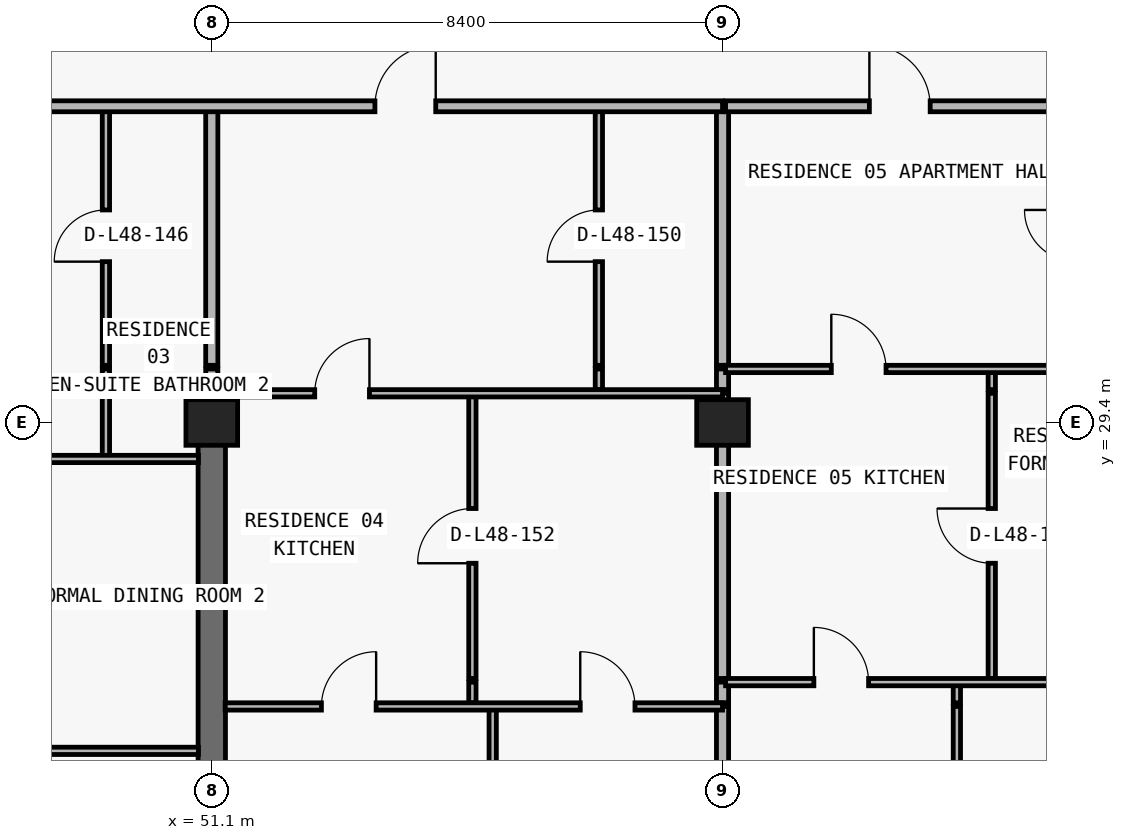
"""IFC4 building model, lengths in metres.
Left out: names, types, materials, properties, quantities, classifications, styles, units other than length and angle.
Written with IfcOpenShell. Run it as: python <this file> out.ifc"""

import sys

from ifc_helpers import new_model, si_unit, direction, frame, frame_2d, origin, origin_2d, place, context, subcontext, project, spatial, rectangle, extrude, element, fill, save


model = new_model("IFC4")
c1 = context("Model", 3, precision=1e-05, world=origin(), true_north=direction((0.0, 1.0)))
c2 = subcontext(c1, "Body", "Model", "MODEL_VIEW")
j1 = project(units=[si_unit("LENGTHUNIT", "METRE"), si_unit("PLANEANGLEUNIT", "RADIAN")], contexts=[c1])
p1 = place(None, origin())
s1 = spatial("IfcSite", under=j1, at=p1, CompositionType="ELEMENT")
p2 = place(p1, origin())
s2 = spatial("IfcBuilding", under=s1, at=p2, CompositionType="ELEMENT")
p3 = place(p2, frame((0.0, 0.0, 173.7)))
s3 = spatial("IfcBuildingStorey", under=s2, at=p3, CompositionType="ELEMENT", Elevation=173.7)
for number, where, z_axis, x_axis in (
    (1, (51.1, 29.4, 0.0), (0.0, 0.0, 1.0), (1.0, 0.0, 0.0)),
    (2, (59.5, 29.4, 0.0), (0.0, 0.0, 1.0), (1.0, 0.0, 0.0)),
):
    element("IfcColumn", number, at=place(p3, frame(where, z_axis=z_axis, x_axis=x_axis)), inside=s3, PredefinedType="COLUMN", context=c2, shape_type="SweptSolid", body=[
        extrude(rectangle(XDim=0.85, YDim=0.75, at=origin_2d()), origin(), (0.0, 0.0, 1.0), 3.05),
    ])
p4 = place(p3, frame((51.1, 20.8, 0.0), z_axis=(0.0, 0.0, 1.0), x_axis=(0.0, 1.0, 0.0)))
e3 = element("IfcWall", 3, at=p4, inside=s3, PredefinedType="SHEAR", context=c2, shape_type="SweptSolid", body=[
    extrude(rectangle(XDim=8.6, YDim=0.45, at=frame_2d((4.3, 0.0))), origin(), (0.0, 0.0, 1.0), 3.05),
])
p5 = place(p3, frame((49.359, 28.8, 0.0), z_axis=(0.0, 0.0, 1.0), x_axis=(0.0, 1.0, 0.0)))
e4 = element("IfcWall", 4, at=p5, inside=s3, PredefinedType="PARTITIONING", context=c2, shape_type="SweptSolid", body=[
    extrude(rectangle(XDim=1.08, YDim=0.12, at=frame_2d((0.54, 0.0))), origin(), (0.0, 0.0, 1.0), 3.05),
])
p6 = place(p3, frame((49.359, 29.94, 0.0), z_axis=(0.0, 0.0, 1.0), x_axis=(0.0, 1.0, 0.0)))
e5 = element("IfcWall", 5, at=p6, inside=s3, PredefinedType="PARTITIONING", context=c2, shape_type="SweptSolid", body=[
    extrude(rectangle(XDim=0.34, YDim=0.12, at=frame_2d((0.17, 0.0))), origin(), (0.0, 0.0, 1.0), 3.05),
])
p7 = place(p3, frame((49.359, 30.34, 0.0), z_axis=(0.0, 0.0, 1.0), x_axis=(0.0, 1.0, 0.0)))
e6 = element("IfcWall", 6, at=p7, inside=s3, PredefinedType="PARTITIONING", context=c2, shape_type="SweptSolid", body=[
    extrude(rectangle(XDim=4.26, YDim=0.12, at=frame_2d((2.13, 0.0))), origin(), (0.0, 0.0, 1.0), 3.05),
])
p8 = place(p7, frame((1.705, 0.0, 0.0)))
e7 = element("IfcOpeningElement", 7, at=p8, cuts=e6, PredefinedType="OPENING", context=c2, shape_type="SweptSolid", body=[
    extrude(rectangle(XDim=0.85, YDim=2.1, at=frame_2d((0.425, 1.05))), frame((0.0, 0.07, 0.0), z_axis=(0.0, -1.0, 0.0), x_axis=(1.0, 0.0, 0.0)), (0.0, 0.0, 1.0), 0.14),
])
p9 = place(p3, frame((51.1, 29.405, 0.0), z_axis=(0.0, 0.0, 1.0), x_axis=(0.0, 1.0, 0.0)))
e8 = element("IfcWall", 8, at=p9, inside=s3, PredefinedType="PARTITIONING", context=c2, shape_type="SweptSolid", body=[
    extrude(rectangle(XDim=0.475, YDim=0.2, at=frame_2d((0.237, 0.0))), origin(), (0.0, 0.0, 1.0), 2.335),
])
p10 = place(p3, frame((51.1, 29.94, 0.0), z_axis=(0.0, 0.0, 1.0), x_axis=(0.0, 1.0, 0.0)))
e9 = element("IfcWall", 9, at=p10, inside=s3, PredefinedType="PARTITIONING", context=c2, shape_type="SweptSolid", body=[
    extrude(rectangle(XDim=0.34, YDim=0.2, at=frame_2d((0.17, 0.0))), origin(), (0.0, 0.0, 1.0), 2.335),
])
p11 = place(p3, frame((51.1, 30.34, 0.0), z_axis=(0.0, 0.0, 1.0), x_axis=(0.0, 1.0, 0.0)))
e10 = element("IfcWall", 10, at=p11, inside=s3, PredefinedType="PARTITIONING", context=c2, shape_type="SweptSolid", body=[
    extrude(rectangle(XDim=4.26, YDim=0.2, at=frame_2d((2.13, 0.0))), origin(), (0.0, 0.0, 1.0), 2.335),
])
p12 = place(p3, frame((55.386, 24.79, 0.0), z_axis=(0.0, 0.0, 1.0), x_axis=(0.0, 1.0, 0.0)))
e11 = element("IfcWall", 11, at=p12, inside=s3, PredefinedType="PARTITIONING", context=c2, shape_type="SweptSolid", body=[
    extrude(rectangle(XDim=0.34, YDim=0.12, at=frame_2d((0.17, 0.0))), origin(), (0.0, 0.0, 1.0), 3.05),
])
p13 = place(p3, frame((55.386, 25.19, 0.0), z_axis=(0.0, 0.0, 1.0), x_axis=(0.0, 1.0, 0.0)))
e12 = element("IfcWall", 12, at=p13, inside=s3, PredefinedType="PARTITIONING", context=c2, shape_type="SweptSolid", body=[
    extrude(rectangle(XDim=4.69, YDim=0.12, at=frame_2d((2.345, 0.0))), origin(), (0.0, 0.0, 1.0), 2.725),
])
p14 = place(p13, frame((1.895, 0.0, 0.0)))
e13 = element("IfcOpeningElement", 13, at=p14, cuts=e12, PredefinedType="OPENING", context=c2, shape_type="SweptSolid", body=[
    extrude(rectangle(XDim=0.9, YDim=2.15, at=frame_2d((0.45, 1.075))), frame((0.0, 0.07, 0.0), z_axis=(0.0, -1.0, 0.0), x_axis=(1.0, 0.0, 0.0)), (0.0, 0.0, 1.0), 0.14),
])
p15 = place(p3, frame((55.72, 11.24, 0.0), z_axis=(0.0, 0.0, 1.0), x_axis=(0.0, 1.0, 0.0)))
e14 = element("IfcWall", 14, at=p15, inside=s3, PredefinedType="PARTITIONING", context=c2, shape_type="SweptSolid", body=[
    extrude(rectangle(XDim=13.49, YDim=0.12, at=frame_2d((6.745, 0.0))), origin(), (0.0, 0.0, 1.0), 3.05),
])
p16 = place(p3, frame((57.466, 29.94, 0.0), z_axis=(0.0, 0.0, 1.0), x_axis=(0.0, 1.0, 0.0)))
e15 = element("IfcWall", 15, at=p16, inside=s3, PredefinedType="PARTITIONING", context=c2, shape_type="SweptSolid", body=[
    extrude(rectangle(XDim=0.34, YDim=0.12, at=frame_2d((0.17, 0.0))), origin(), (0.0, 0.0, 1.0), 3.05),
])
p17 = place(p3, frame((57.466, 30.34, 0.0), z_axis=(0.0, 0.0, 1.0), x_axis=(0.0, 1.0, 0.0)))
e16 = element("IfcWall", 16, at=p17, inside=s3, PredefinedType="PARTITIONING", context=c2, shape_type="SweptSolid", body=[
    extrude(rectangle(XDim=4.26, YDim=0.12, at=frame_2d((2.13, 0.0))), origin(), (0.0, 0.0, 1.0), 3.05),
])
p18 = place(p17, frame((1.705, 0.0, 0.0)))
e17 = element("IfcOpeningElement", 17, at=p18, cuts=e16, PredefinedType="OPENING", context=c2, shape_type="SweptSolid", body=[
    extrude(rectangle(XDim=0.85, YDim=2.1, at=frame_2d((0.425, 1.05))), frame((0.0, 0.07, 0.0), z_axis=(0.0, -1.0, 0.0), x_axis=(1.0, 0.0, 0.0)), (0.0, 0.0, 1.0), 0.14),
])
p19 = place(p3, frame((59.5, 11.24, 0.0), z_axis=(0.0, 0.0, 1.0), x_axis=(0.0, 1.0, 0.0)))
e18 = element("IfcWall", 18, at=p19, inside=s3, PredefinedType="PARTITIONING", context=c2, shape_type="SweptSolid", body=[
    extrude(rectangle(XDim=13.49, YDim=0.2, at=frame_2d((6.745, 0.0))), origin(), (0.0, 0.0, 1.0), 2.263),
])
p20 = place(p3, frame((59.5, 24.79, 0.0), z_axis=(0.0, 0.0, 1.0), x_axis=(0.0, 1.0, 0.0)))
e19 = element("IfcWall", 19, at=p20, inside=s3, PredefinedType="PARTITIONING", context=c2, shape_type="SweptSolid", body=[
    extrude(rectangle(XDim=0.34, YDim=0.2, at=frame_2d((0.17, 0.0))), origin(), (0.0, 0.0, 1.0), 2.263),
])
p21 = place(p3, frame((59.5, 25.19, 0.0), z_axis=(0.0, 0.0, 1.0), x_axis=(0.0, 1.0, 0.0)))
e20 = element("IfcWall", 20, at=p21, inside=s3, PredefinedType="PARTITIONING", context=c2, shape_type="SweptSolid", body=[
    extrude(rectangle(XDim=4.69, YDim=0.2, at=frame_2d((2.345, 0.0))), origin(), (0.0, 0.0, 1.0), 2.263),
])
p22 = place(p3, frame((59.5, 29.94, 0.0), z_axis=(0.0, 0.0, 1.0), x_axis=(0.0, 1.0, 0.0)))
e21 = element("IfcWall", 21, at=p22, inside=s3, PredefinedType="PARTITIONING", context=c2, shape_type="SweptSolid", body=[
    extrude(rectangle(XDim=0.34, YDim=0.2, at=frame_2d((0.17, 0.0))), origin(), (0.0, 0.0, 1.0), 2.263),
])
p23 = place(p3, frame((59.5, 30.34, 0.0), z_axis=(0.0, 0.0, 1.0), x_axis=(0.0, 1.0, 0.0)))
e22 = element("IfcWall", 22, at=p23, inside=s3, PredefinedType="PARTITIONING", context=c2, shape_type="SweptSolid", body=[
    extrude(rectangle(XDim=4.26, YDim=0.2, at=frame_2d((2.13, 0.0))), origin(), (0.0, 0.0, 1.0), 2.263),
])
p24 = place(p3, frame((63.354, 11.24, 0.0), z_axis=(0.0, 0.0, 1.0), x_axis=(0.0, 1.0, 0.0)))
e23 = element("IfcWall", 23, at=p24, inside=s3, PredefinedType="PARTITIONING", context=c2, shape_type="SweptSolid", body=[
    extrude(rectangle(XDim=13.49, YDim=0.12, at=frame_2d((6.745, 0.0))), origin(), (0.0, 0.0, 1.0), 3.05),
])
p25 = place(p3, frame((63.354, 24.79, 0.0), z_axis=(0.0, 0.0, 1.0), x_axis=(0.0, 1.0, 0.0)))
e24 = element("IfcWall", 24, at=p25, inside=s3, PredefinedType="PARTITIONING", context=c2, shape_type="SweptSolid", body=[
    extrude(rectangle(XDim=0.34, YDim=0.12, at=frame_2d((0.17, 0.0))), origin(), (0.0, 0.0, 1.0), 3.05),
])
p26 = place(p3, frame((63.928, 25.19, 0.0), z_axis=(0.0, 0.0, 1.0), x_axis=(0.0, 1.0, 0.0)))
e25 = element("IfcWall", 25, at=p26, inside=s3, PredefinedType="PARTITIONING", context=c2, shape_type="SweptSolid", body=[
    extrude(rectangle(XDim=4.69, YDim=0.12, at=frame_2d((2.345, 0.0))), origin(), (0.0, 0.0, 1.0), 3.05),
])
p27 = place(p26, frame((1.895, 0.0, 0.0)))
e26 = element("IfcOpeningElement", 26, at=p27, cuts=e25, PredefinedType="OPENING", context=c2, shape_type="SweptSolid", body=[
    extrude(rectangle(XDim=0.9, YDim=2.15, at=frame_2d((0.45, 1.075))), frame((0.0, 0.07, 0.0), z_axis=(0.0, -1.0, 0.0), x_axis=(1.0, 0.0, 0.0)), (0.0, 0.0, 1.0), 0.14),
])
p28 = place(p3, frame((63.928, 29.94, 0.0), z_axis=(0.0, 0.0, 1.0), x_axis=(0.0, 1.0, 0.0)))
e27 = element("IfcWall", 27, at=p28, inside=s3, PredefinedType="PARTITIONING", context=c2, shape_type="SweptSolid", body=[
    extrude(rectangle(XDim=0.34, YDim=0.12, at=frame_2d((0.17, 0.0))), origin(), (0.0, 0.0, 1.0), 3.05),
])
p29 = place(p3, frame((42.7, 24.0, 0.0), z_axis=(0.0, 0.0, 1.0), x_axis=(1.0, 0.0, 0.0)))
e28 = element("IfcWall", 28, at=p29, inside=s3, PredefinedType="PARTITIONING", context=c2, shape_type="SweptSolid", body=[
    extrude(rectangle(XDim=8.18, YDim=0.12, at=frame_2d((4.09, 0.0))), origin(), (0.0, 0.0, 1.0), 3.05),
])
p30 = place(p29, frame((3.64, 0.0, 0.0)))
e29 = element("IfcOpeningElement", 29, at=p30, cuts=e28, PredefinedType="OPENING", context=c2, shape_type="SweptSolid", body=[
    extrude(rectangle(XDim=0.9, YDim=2.15, at=frame_2d((0.45, 1.075))), frame((0.0, 0.07, 0.0), z_axis=(0.0, -1.0, 0.0), x_axis=(1.0, 0.0, 0.0)), (0.0, 0.0, 1.0), 0.14),
])
p31 = place(p3, frame((51.32, 24.73, 0.0), z_axis=(0.0, 0.0, 1.0), x_axis=(1.0, 0.0, 0.0)))
e30 = element("IfcWall", 30, at=p31, inside=s3, PredefinedType="PARTITIONING", context=c2, shape_type="SweptSolid", body=[
    extrude(rectangle(XDim=8.18, YDim=0.12, at=frame_2d((4.09, 0.0))), origin(), (0.0, 0.0, 1.0), 3.05),
])
p32 = place(p31, frame((1.583, 0.0, 0.0)))
e31 = element("IfcOpeningElement", 31, at=p32, cuts=e30, PredefinedType="OPENING", context=c2, shape_type="SweptSolid", body=[
    extrude(rectangle(XDim=0.9, YDim=2.15, at=frame_2d((0.45, 1.075))), frame((0.0, 0.07, 0.0), z_axis=(0.0, -1.0, 0.0), x_axis=(1.0, 0.0, 0.0)), (0.0, 0.0, 1.0), 0.14),
])
p33 = place(p31, frame((5.84, 0.0, 0.0)))
e32 = element("IfcOpeningElement", 32, at=p33, cuts=e30, PredefinedType="OPENING", context=c2, shape_type="SweptSolid", body=[
    extrude(rectangle(XDim=0.9, YDim=2.15, at=frame_2d((0.45, 1.075))), frame((0.0, 0.07, 0.0), z_axis=(0.0, -1.0, 0.0), x_axis=(1.0, 0.0, 0.0)), (0.0, 0.0, 1.0), 0.14),
])
p34 = place(p3, frame((59.55, 25.13, 0.0), z_axis=(0.0, 0.0, 1.0), x_axis=(1.0, 0.0, 0.0)))
e33 = element("IfcWall", 33, at=p34, inside=s3, PredefinedType="PARTITIONING", context=c2, shape_type="SweptSolid", body=[
    extrude(rectangle(XDim=5.73, YDim=0.12, at=frame_2d((2.865, 0.0))), origin(), (0.0, 0.0, 1.0), 3.05),
])
p35 = place(p34, frame((1.452, 0.0, 0.0)))
e34 = element("IfcOpeningElement", 34, at=p35, cuts=e33, PredefinedType="OPENING", context=c2, shape_type="SweptSolid", body=[
    extrude(rectangle(XDim=0.9, YDim=2.15, at=frame_2d((0.45, 1.075))), frame((0.0, 0.07, 0.0), z_axis=(0.0, -1.0, 0.0), x_axis=(1.0, 0.0, 0.0)), (0.0, 0.0, 1.0), 0.14),
])
p36 = place(p3, frame((42.705, 28.8, 0.0), z_axis=(0.0, 0.0, 1.0), x_axis=(1.0, 0.0, 0.0)))
e35 = element("IfcWall", 35, at=p36, inside=s3, PredefinedType="PARTITIONING", context=c2, shape_type="SweptSolid", body=[
    extrude(rectangle(XDim=8.175, YDim=0.12, at=frame_2d((4.087, 0.0))), origin(), (0.0, 0.0, 1.0), 3.05),
])
p37 = place(p36, frame((2.877, 0.0, 0.0)))
e36 = element("IfcOpeningElement", 36, at=p37, cuts=e35, PredefinedType="OPENING", context=c2, shape_type="SweptSolid", body=[
    extrude(rectangle(XDim=0.9, YDim=2.15, at=frame_2d((0.45, 1.075))), frame((0.0, 0.07, 0.0), z_axis=(0.0, -1.0, 0.0), x_axis=(1.0, 0.0, 0.0)), (0.0, 0.0, 1.0), 0.14),
])
p38 = place(p3, frame((51.1, 29.88, 0.0), z_axis=(0.0, 0.0, 1.0), x_axis=(1.0, 0.0, 0.0)))
e37 = element("IfcWall", 37, at=p38, inside=s3, PredefinedType="PARTITIONING", context=c2, shape_type="SweptSolid", body=[
    extrude(rectangle(XDim=8.4, YDim=0.12, at=frame_2d((4.2, 0.0))), origin(), (0.0, 0.0, 1.0), 3.05),
])
p39 = place(p38, frame((1.693, 0.0, 0.0)))
e38 = element("IfcOpeningElement", 38, at=p39, cuts=e37, PredefinedType="OPENING", context=c2, shape_type="SweptSolid", body=[
    extrude(rectangle(XDim=0.9, YDim=2.15, at=frame_2d((0.45, 1.075))), frame((0.0, 0.07, 0.0), z_axis=(0.0, -1.0, 0.0), x_axis=(1.0, 0.0, 0.0)), (0.0, 0.0, 1.0), 0.14),
])
p40 = place(p3, frame((59.55, 30.28, 0.0), z_axis=(0.0, 0.0, 1.0), x_axis=(1.0, 0.0, 0.0)))
e39 = element("IfcWall", 39, at=p40, inside=s3, PredefinedType="PARTITIONING", context=c2, shape_type="SweptSolid", body=[
    extrude(rectangle(XDim=5.73, YDim=0.12, at=frame_2d((2.865, 0.0))), origin(), (0.0, 0.0, 1.0), 3.05),
])
p41 = place(p40, frame((1.739, 0.0, 0.0)))
e40 = element("IfcOpeningElement", 40, at=p41, cuts=e39, PredefinedType="OPENING", context=c2, shape_type="SweptSolid", body=[
    extrude(rectangle(XDim=0.9, YDim=2.15, at=frame_2d((0.45, 1.075))), frame((0.0, 0.07, 0.0), z_axis=(0.0, -1.0, 0.0), x_axis=(1.0, 0.0, 0.0)), (0.0, 0.0, 1.0), 0.14),
])
p42 = place(p3, frame((18.3, 34.6, 0.0), z_axis=(0.0, 0.0, 1.0), x_axis=(1.0, 0.0, 0.0)))
e41 = element("IfcWall", 41, at=p42, inside=s3, PredefinedType="PARTITIONING", context=c2, shape_type="SweptSolid", body=[
    extrude(rectangle(XDim=41.2, YDim=0.18, at=frame_2d((20.6, 0.0))), origin(), (0.0, 0.0, 1.0), 3.05),
])
p43 = place(p42, frame((2.67, 0.0, 0.0)))
e42 = element("IfcOpeningElement", 42, at=p43, cuts=e41, PredefinedType="OPENING", context=c2, shape_type="SweptSolid", body=[
    extrude(rectangle(XDim=1.0, YDim=2.2, at=frame_2d((0.5, 1.1))), frame((0.0, 0.1, 0.0), z_axis=(0.0, -1.0, 0.0), x_axis=(1.0, 0.0, 0.0)), (0.0, 0.0, 1.0), 0.2),
])
p44 = place(p42, frame((11.212, 0.0, 0.0)))
e43 = element("IfcOpeningElement", 43, at=p44, cuts=e41, PredefinedType="OPENING", context=c2, shape_type="SweptSolid", body=[
    extrude(rectangle(XDim=1.0, YDim=2.2, at=frame_2d((0.5, 1.1))), frame((0.0, 0.1, 0.0), z_axis=(0.0, -1.0, 0.0), x_axis=(1.0, 0.0, 0.0)), (0.0, 0.0, 1.0), 0.2),
])
p45 = place(p42, frame((35.483, 0.0, 0.0)))
e44 = element("IfcOpeningElement", 44, at=p45, cuts=e41, PredefinedType="OPENING", context=c2, shape_type="SweptSolid", body=[
    extrude(rectangle(XDim=1.0, YDim=2.2, at=frame_2d((0.5, 1.1))), frame((0.0, 0.1, 0.0), z_axis=(0.0, -1.0, 0.0), x_axis=(1.0, 0.0, 0.0)), (0.0, 0.0, 1.0), 0.2),
])
p46 = place(p3, frame((59.55, 34.6, 0.0), z_axis=(0.0, 0.0, 1.0), x_axis=(1.0, 0.0, 0.0)))
e45 = element("IfcWall", 45, at=p46, inside=s3, PredefinedType="PARTITIONING", context=c2, shape_type="SweptSolid", body=[
    extrude(rectangle(XDim=5.73, YDim=0.18, at=frame_2d((2.865, 0.0))), origin(), (0.0, 0.0, 1.0), 3.05),
])
p47 = place(p46, frame((2.365, 0.0, 0.0)))
e46 = element("IfcOpeningElement", 46, at=p47, cuts=e45, PredefinedType="OPENING", context=c2, shape_type="SweptSolid", body=[
    extrude(rectangle(XDim=1.0, YDim=2.2, at=frame_2d((0.5, 1.1))), frame((0.0, 0.1, 0.0), z_axis=(0.0, -1.0, 0.0), x_axis=(1.0, 0.0, 0.0)), (0.0, 0.0, 1.0), 0.2),
])
p48 = place(p8, origin())
e47 = element("IfcDoor", 47, at=p48, inside=s3, OperationType="SINGLE_SWING_LEFT", PredefinedType="DOOR", context=c2, shape_type="SweptSolid", body=[
    extrude(rectangle(XDim=0.85, YDim=2.1, at=frame_2d((0.425, 1.05))), frame((0.0, 0.025, 0.0), z_axis=(0.0, -1.0, 0.0), x_axis=(1.0, 0.0, 0.0)), (0.0, 0.0, 1.0), 0.05),
])
fill(e7, e47)
p49 = place(p45, origin())
e48 = element("IfcDoor", 48, at=p49, inside=s3, OperationType="SINGLE_SWING_RIGHT", PredefinedType="DOOR", context=c2, shape_type="SweptSolid", body=[
    extrude(rectangle(XDim=1.0, YDim=2.2, at=frame_2d((0.5, 1.1))), frame((0.0, 0.025, 0.0), z_axis=(0.0, -1.0, 0.0), x_axis=(1.0, 0.0, 0.0)), (0.0, 0.0, 1.0), 0.05),
])
fill(e44, e48)
p50 = place(p18, origin())
e49 = element("IfcDoor", 49, at=p50, inside=s3, OperationType="SINGLE_SWING_LEFT", PredefinedType="DOOR", context=c2, shape_type="SweptSolid", body=[
    extrude(rectangle(XDim=0.85, YDim=2.1, at=frame_2d((0.425, 1.05))), frame((0.0, 0.025, 0.0), z_axis=(0.0, -1.0, 0.0), x_axis=(1.0, 0.0, 0.0)), (0.0, 0.0, 1.0), 0.05),
])
fill(e17, e49)
p51 = place(p39, origin())
e50 = element("IfcDoor", 50, at=p51, inside=s3, OperationType="SINGLE_SWING_RIGHT", PredefinedType="DOOR", context=c2, shape_type="SweptSolid", body=[
    extrude(rectangle(XDim=0.9, YDim=2.15, at=frame_2d((0.45, 1.075))), frame((0.0, 0.025, 0.0), z_axis=(0.0, -1.0, 0.0), x_axis=(1.0, 0.0, 0.0)), (0.0, 0.0, 1.0), 0.05),
])
fill(e38, e50)
p52 = place(p14, origin())
e51 = element("IfcDoor", 51, at=p52, inside=s3, OperationType="SINGLE_SWING_LEFT", PredefinedType="DOOR", context=c2, shape_type="SweptSolid", body=[
    extrude(rectangle(XDim=0.9, YDim=2.15, at=frame_2d((0.45, 1.075))), frame((0.0, 0.025, 0.0), z_axis=(0.0, -1.0, 0.0), x_axis=(1.0, 0.0, 0.0)), (0.0, 0.0, 1.0), 0.05),
])
fill(e13, e51)
p53 = place(p32, origin())
e52 = element("IfcDoor", 52, at=p53, inside=s3, OperationType="SINGLE_SWING_RIGHT", PredefinedType="DOOR", context=c2, shape_type="SweptSolid", body=[
    extrude(rectangle(XDim=0.9, YDim=2.15, at=frame_2d((0.45, 1.075))), frame((0.0, 0.025, 0.0), z_axis=(0.0, -1.0, 0.0), x_axis=(1.0, 0.0, 0.0)), (0.0, 0.0, 1.0), 0.05),
])
fill(e31, e52)
p54 = place(p33, origin())
e53 = element("IfcDoor", 53, at=p54, inside=s3, OperationType="SINGLE_SWING_LEFT", PredefinedType="DOOR", context=c2, shape_type="SweptSolid", body=[
    extrude(rectangle(XDim=0.9, YDim=2.15, at=frame_2d((0.45, 1.075))), frame((0.0, 0.025, 0.0), z_axis=(0.0, -1.0, 0.0), x_axis=(1.0, 0.0, 0.0)), (0.0, 0.0, 1.0), 0.05),
])
fill(e32, e53)
p55 = place(p47, origin())
e54 = element("IfcDoor", 54, at=p55, inside=s3, OperationType="SINGLE_SWING_LEFT", PredefinedType="DOOR", context=c2, shape_type="SweptSolid", body=[
    extrude(rectangle(XDim=1.0, YDim=2.2, at=frame_2d((0.5, 1.1))), frame((0.0, 0.025, 0.0), z_axis=(0.0, -1.0, 0.0), x_axis=(1.0, 0.0, 0.0)), (0.0, 0.0, 1.0), 0.05),
])
fill(e46, e54)
p56 = place(p41, origin())
e55 = element("IfcDoor", 55, at=p56, inside=s3, OperationType="SINGLE_SWING_LEFT", PredefinedType="DOOR", context=c2, shape_type="SweptSolid", body=[
    extrude(rectangle(XDim=0.9, YDim=2.15, at=frame_2d((0.45, 1.075))), frame((0.0, 0.025, 0.0), z_axis=(0.0, -1.0, 0.0), x_axis=(1.0, 0.0, 0.0)), (0.0, 0.0, 1.0), 0.05),
])
fill(e40, e55)
p57 = place(p27, origin())
e56 = element("IfcDoor", 56, at=p57, inside=s3, OperationType="SINGLE_SWING_RIGHT", PredefinedType="DOOR", context=c2, shape_type="SweptSolid", body=[
    extrude(rectangle(XDim=0.9, YDim=2.15, at=frame_2d((0.45, 1.075))), frame((0.0, 0.025, 0.0), z_axis=(0.0, -1.0, 0.0), x_axis=(1.0, 0.0, 0.0)), (0.0, 0.0, 1.0), 0.05),
])
fill(e26, e56)
p58 = place(p35, origin())
e57 = element("IfcDoor", 57, at=p58, inside=s3, OperationType="SINGLE_SWING_LEFT", PredefinedType="DOOR", context=c2, shape_type="SweptSolid", body=[
    extrude(rectangle(XDim=0.9, YDim=2.15, at=frame_2d((0.45, 1.075))), frame((0.0, 0.025, 0.0), z_axis=(0.0, -1.0, 0.0), x_axis=(1.0, 0.0, 0.0)), (0.0, 0.0, 1.0), 0.05),
])
fill(e34, e57)
save(model, sys.argv[1])
